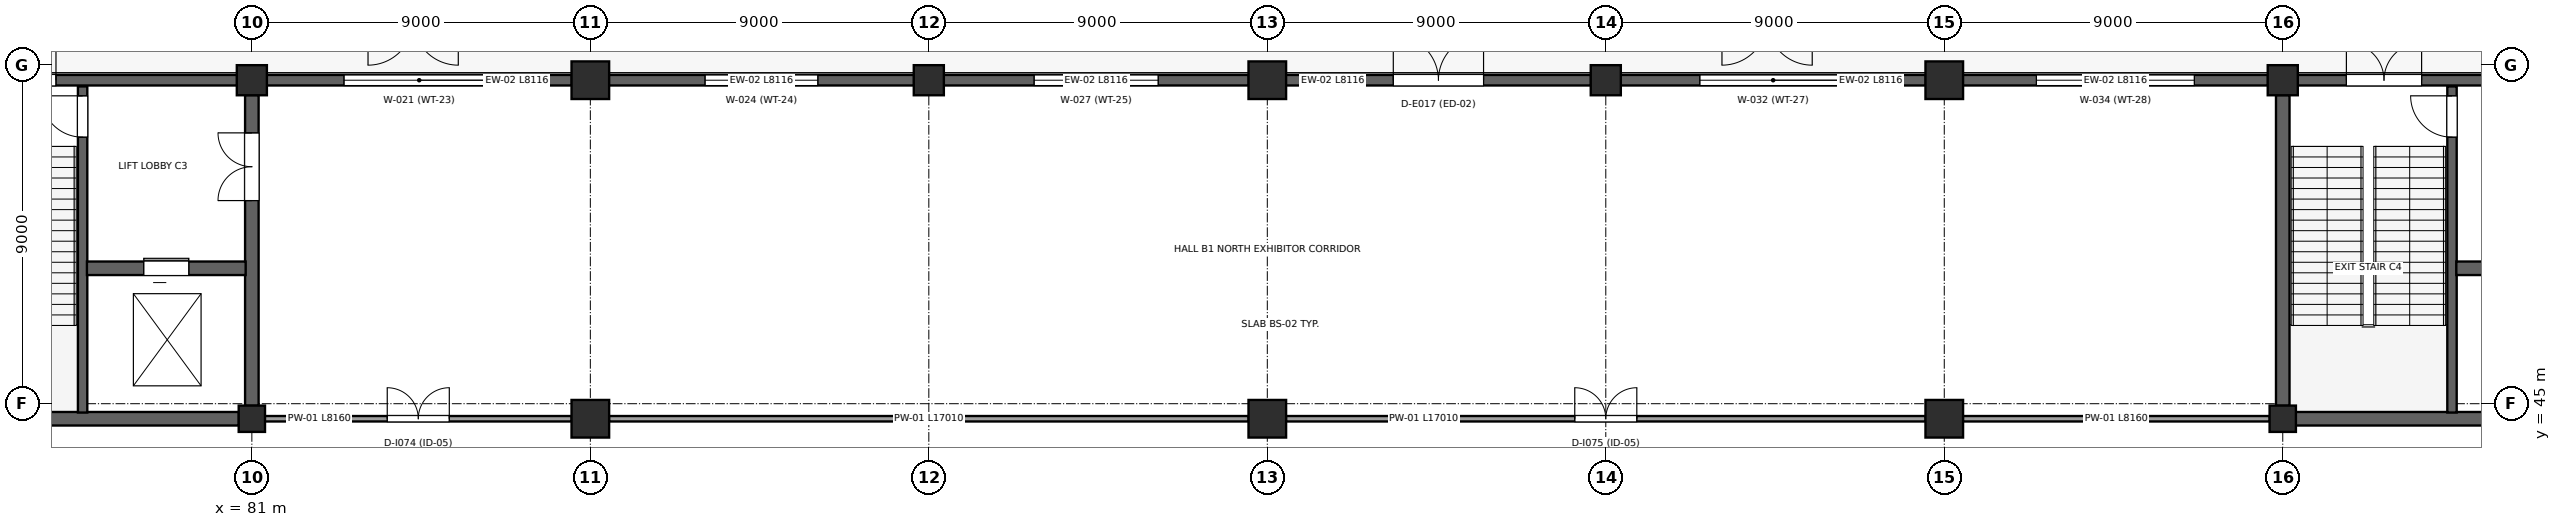
"""IFC4 building model, lengths in metres.
Left out: names, types, materials, properties, quantities, classifications, styles, units other than length and angle.
Written with IfcOpenShell. Run it as: python <this file> out.ifc"""

import sys

from ifc_helpers import new_model, si_unit, direction, frame, frame_2d, origin, origin_2d, place, context, subcontext, project, spatial, rectangle, extrude, element, fill, save


model = new_model("IFC4")
c1 = context("Model", 3, precision=1e-05, world=origin(), true_north=direction((0.0, 1.0)))
c2 = subcontext(c1, "Body", "Model", "MODEL_VIEW")
j1 = project(units=[si_unit("LENGTHUNIT", "METRE"), si_unit("PLANEANGLEUNIT", "RADIAN")], contexts=[c1])
p1 = place(None, origin())
s1 = spatial("IfcSite", under=j1, at=p1, CompositionType="ELEMENT")
p2 = place(p1, origin())
s2 = spatial("IfcBuilding", under=s1, at=p2, CompositionType="ELEMENT")
p3 = place(p2, origin())
s3 = spatial("IfcBuildingStorey", under=s2, at=p3, CompositionType="ELEMENT", Elevation=0.0)
for number, where, z_axis, x_axis in (
    (1, (90.0, 44.6, 0.0), (0.0, 0.0, 1.0), (1.0, 0.0, 0.0)),
    (2, (90.0, 53.6, 0.0), (0.0, 0.0, 1.0), (1.0, 0.0, 0.0)),
    (3, (108.0, 44.6, 0.0), (0.0, 0.0, 1.0), (1.0, 0.0, 0.0)),
    (4, (108.0, 53.6, 0.0), (0.0, 0.0, 1.0), (1.0, 0.0, 0.0)),
    (5, (126.0, 44.6, 0.0), (0.0, 0.0, 1.0), (1.0, 0.0, 0.0)),
    (6, (126.0, 53.6, 0.0), (0.0, 0.0, 1.0), (1.0, 0.0, 0.0)),
):
    element("IfcColumn", number, at=place(p3, frame(where, z_axis=z_axis, x_axis=x_axis)), inside=s3, PredefinedType="COLUMN", context=c2, shape_type="SweptSolid", body=[
        extrude(rectangle(XDim=1.0, YDim=1.0, at=origin_2d()), origin(), (0.0, 0.0, 1.0), 6.0),
    ])
for number, where, z_axis, x_axis in (
    (7, (81.0, 53.6, 0.0), (0.0, 0.0, 1.0), (1.0, 0.0, 0.0)),
    (8, (99.0, 53.6, 0.0), (0.0, 0.0, 1.0), (1.0, 0.0, 0.0)),
    (9, (117.0, 53.6, 0.0), (0.0, 0.0, 1.0), (1.0, 0.0, 0.0)),
    (10, (135.0, 53.6, 0.0), (0.0, 0.0, 1.0), (1.0, 0.0, 0.0)),
):
    element("IfcColumn", number, at=place(p3, frame(where, z_axis=z_axis, x_axis=x_axis)), inside=s3, PredefinedType="COLUMN", context=c2, shape_type="SweptSolid", body=[
        extrude(rectangle(XDim=0.8, YDim=0.8, at=origin_2d()), origin(), (0.0, 0.0, 1.0), 6.0),
    ])
for number, where, z_axis, x_axis in (
    (11, (81.0, 44.6, 0.0), (0.0, 0.0, 1.0), (1.0, 0.0, 0.0)),
    (12, (135.0, 44.6, 0.0), (0.0, 0.0, 1.0), (1.0, 0.0, 0.0)),
):
    element("IfcColumn", number, at=place(p3, frame(where, z_axis=z_axis, x_axis=x_axis)), inside=s3, PredefinedType="COLUMN", context=c2, shape_type="SweptSolid", body=[
        extrude(rectangle(XDim=0.7, YDim=0.7, at=origin_2d()), origin(), (0.0, 0.0, 1.0), 6.0),
    ])
p4 = place(p3, frame((72.492, 53.6, 0.0), z_axis=(0.0, 0.0, 1.0), x_axis=(1.0, 0.0, 0.0)))
e13 = element("IfcWall", 13, at=p4, inside=s3, PredefinedType="STANDARD", context=c2, shape_type="SweptSolid", body=[
    extrude(rectangle(XDim=8.116, YDim=0.28, at=frame_2d((4.058, 0.0))), origin(), (0.0, 0.0, 1.0), 5.75),
])
p5 = place(p4, frame((1.3, 0.0, 0.0)))
e14 = element("IfcOpeningElement", 14, at=p5, cuts=e13, PredefinedType="OPENING", context=c2, shape_type="SweptSolid", body=[
    extrude(rectangle(XDim=2.0, YDim=2.4, at=frame_2d((1.0, 1.2))), frame((0.0, 0.15, 0.0), z_axis=(0.0, -1.0, 0.0), x_axis=(1.0, 0.0, 0.0)), (0.0, 0.0, 1.0), 0.3),
])
p6 = place(p3, frame((81.392, 53.6, 0.0), z_axis=(0.0, 0.0, 1.0), x_axis=(1.0, 0.0, 0.0)))
e15 = element("IfcWall", 15, at=p6, inside=s3, PredefinedType="STANDARD", context=c2, shape_type="SweptSolid", body=[
    extrude(rectangle(XDim=8.116, YDim=0.28, at=frame_2d((4.058, 0.0))), origin(), (0.0, 0.0, 1.0), 5.75),
])
p7 = place(p6, frame((2.058, 0.0, 2.6)))
e16 = element("IfcOpeningElement", 16, at=p7, cuts=e15, PredefinedType="OPENING", context=c2, shape_type="SweptSolid", body=[
    extrude(rectangle(XDim=4.0, YDim=1.25, at=frame_2d((2.0, 0.625))), frame((0.0, 0.15, 0.0), z_axis=(0.0, -1.0, 0.0), x_axis=(1.0, 0.0, 0.0)), (0.0, 0.0, 1.0), 0.3),
])
p8 = place(p3, frame((90.492, 53.6, 0.0), z_axis=(0.0, 0.0, 1.0), x_axis=(1.0, 0.0, 0.0)))
e17 = element("IfcWall", 17, at=p8, inside=s3, PredefinedType="STANDARD", context=c2, shape_type="SweptSolid", body=[
    extrude(rectangle(XDim=8.116, YDim=0.28, at=frame_2d((4.058, 0.0))), origin(), (0.0, 0.0, 1.0), 5.75),
])
p9 = place(p8, frame((2.558, 0.0, 2.6)))
e18 = element("IfcOpeningElement", 18, at=p9, cuts=e17, PredefinedType="OPENING", context=c2, shape_type="SweptSolid", body=[
    extrude(rectangle(XDim=3.0, YDim=1.45, at=frame_2d((1.5, 0.725))), frame((0.0, 0.15, 0.0), z_axis=(0.0, -1.0, 0.0), x_axis=(1.0, 0.0, 0.0)), (0.0, 0.0, 1.0), 0.3),
])
p10 = place(p3, frame((99.392, 53.6, 0.0), z_axis=(0.0, 0.0, 1.0), x_axis=(1.0, 0.0, 0.0)))
e19 = element("IfcWall", 19, at=p10, inside=s3, PredefinedType="STANDARD", context=c2, shape_type="SweptSolid", body=[
    extrude(rectangle(XDim=8.116, YDim=0.28, at=frame_2d((4.058, 0.0))), origin(), (0.0, 0.0, 1.0), 5.75),
])
p11 = place(p10, frame((2.408, 0.0, 2.6)))
e20 = element("IfcOpeningElement", 20, at=p11, cuts=e19, PredefinedType="OPENING", context=c2, shape_type="SweptSolid", body=[
    extrude(rectangle(XDim=3.3, YDim=1.45, at=frame_2d((1.65, 0.725))), frame((0.0, 0.15, 0.0), z_axis=(0.0, -1.0, 0.0), x_axis=(1.0, 0.0, 0.0)), (0.0, 0.0, 1.0), 0.3),
])
p12 = place(p3, frame((108.492, 53.6, 0.0), z_axis=(0.0, 0.0, 1.0), x_axis=(1.0, 0.0, 0.0)))
e21 = element("IfcWall", 21, at=p12, inside=s3, PredefinedType="STANDARD", context=c2, shape_type="SweptSolid", body=[
    extrude(rectangle(XDim=8.116, YDim=0.28, at=frame_2d((4.058, 0.0))), origin(), (0.0, 0.0, 1.0), 5.75),
])
p13 = place(p12, frame((2.858, 0.0, 0.0)))
e22 = element("IfcOpeningElement", 22, at=p13, cuts=e21, PredefinedType="OPENING", context=c2, shape_type="SweptSolid", body=[
    extrude(rectangle(XDim=2.4, YDim=2.6, at=frame_2d((1.2, 1.3))), frame((0.0, 0.15, 0.0), z_axis=(0.0, -1.0, 0.0), x_axis=(1.0, 0.0, 0.0)), (0.0, 0.0, 1.0), 0.3),
])
p14 = place(p3, frame((117.392, 53.6, 0.0), z_axis=(0.0, 0.0, 1.0), x_axis=(1.0, 0.0, 0.0)))
e23 = element("IfcWall", 23, at=p14, inside=s3, PredefinedType="STANDARD", context=c2, shape_type="SweptSolid", body=[
    extrude(rectangle(XDim=8.116, YDim=0.28, at=frame_2d((4.058, 0.0))), origin(), (0.0, 0.0, 1.0), 5.75),
])
p15 = place(p14, frame((2.108, 0.0, 2.6)))
e24 = element("IfcOpeningElement", 24, at=p15, cuts=e23, PredefinedType="OPENING", context=c2, shape_type="SweptSolid", body=[
    extrude(rectangle(XDim=3.9, YDim=1.45, at=frame_2d((1.95, 0.725))), frame((0.0, 0.15, 0.0), z_axis=(0.0, -1.0, 0.0), x_axis=(1.0, 0.0, 0.0)), (0.0, 0.0, 1.0), 0.3),
])
p16 = place(p3, frame((126.492, 53.6, 0.0), z_axis=(0.0, 0.0, 1.0), x_axis=(1.0, 0.0, 0.0)))
e25 = element("IfcWall", 25, at=p16, inside=s3, PredefinedType="STANDARD", context=c2, shape_type="SweptSolid", body=[
    extrude(rectangle(XDim=8.116, YDim=0.28, at=frame_2d((4.058, 0.0))), origin(), (0.0, 0.0, 1.0), 5.75),
])
p17 = place(p16, frame((1.958, 0.0, 2.6)))
e26 = element("IfcOpeningElement", 26, at=p17, cuts=e25, PredefinedType="OPENING", context=c2, shape_type="SweptSolid", body=[
    extrude(rectangle(XDim=4.2, YDim=1.45, at=frame_2d((2.1, 0.725))), frame((0.0, 0.15, 0.0), z_axis=(0.0, -1.0, 0.0), x_axis=(1.0, 0.0, 0.0)), (0.0, 0.0, 1.0), 0.3),
])
p18 = place(p3, frame((135.392, 53.6, 0.0), z_axis=(0.0, 0.0, 1.0), x_axis=(1.0, 0.0, 0.0)))
e27 = element("IfcWall", 27, at=p18, inside=s3, PredefinedType="STANDARD", context=c2, shape_type="SweptSolid", body=[
    extrude(rectangle(XDim=8.116, YDim=0.28, at=frame_2d((4.058, 0.0))), origin(), (0.0, 0.0, 1.0), 5.75),
])
p19 = place(p18, frame((1.3, 0.0, 0.0)))
e28 = element("IfcOpeningElement", 28, at=p19, cuts=e27, PredefinedType="OPENING", context=c2, shape_type="SweptSolid", body=[
    extrude(rectangle(XDim=2.0, YDim=2.4, at=frame_2d((1.0, 1.2))), frame((0.0, 0.15, 0.0), z_axis=(0.0, -1.0, 0.0), x_axis=(1.0, 0.0, 0.0)), (0.0, 0.0, 1.0), 0.3),
])
p20 = place(p3, frame((81.0, 44.945, 0.0), z_axis=(0.0, 0.0, 1.0), x_axis=(0.0, 1.0, 0.0)))
e29 = element("IfcWall", 29, at=p20, inside=s3, PredefinedType="SHEAR", context=c2, shape_type="SweptSolid", body=[
    extrude(rectangle(XDim=8.26, YDim=0.36, at=frame_2d((4.13, 0.0))), origin(), (0.0, 0.0, 1.0), 5.75),
])
p21 = place(p20, frame((5.455, 0.0, 0.0)))
e30 = element("IfcOpeningElement", 30, at=p21, cuts=e29, PredefinedType="OPENING", context=c2, shape_type="SweptSolid", body=[
    extrude(rectangle(XDim=1.8, YDim=2.3, at=frame_2d((0.9, 1.15))), frame((0.0, 0.19, 0.0), z_axis=(0.0, -1.0, 0.0), x_axis=(1.0, 0.0, 0.0)), (0.0, 0.0, 1.0), 0.38),
])
p22 = place(p3, frame((72.495, 44.6, 0.0), z_axis=(0.0, 0.0, 1.0), x_axis=(1.0, 0.0, 0.0)))
e31 = element("IfcWall", 31, at=p22, inside=s3, PredefinedType="SHEAR", context=c2, shape_type="SweptSolid", body=[
    extrude(rectangle(XDim=8.16, YDim=0.36, at=frame_2d((4.08, 0.0))), origin(), (0.0, 0.0, 1.0), 5.75),
])
p23 = place(p3, frame((76.5, 44.765, 0.0), z_axis=(0.0, 0.0, 1.0), x_axis=(0.0, 1.0, 0.0)))
e32 = element("IfcWall", 32, at=p23, inside=s3, PredefinedType="SHEAR", context=c2, shape_type="SweptSolid", body=[
    extrude(rectangle(XDim=8.67, YDim=0.25, at=frame_2d((4.335, 0.0))), origin(), (0.0, 0.0, 1.0), 5.75),
])
p24 = place(p23, frame((7.32, 0.0, 0.0)))
e33 = element("IfcOpeningElement", 33, at=p24, cuts=e32, PredefinedType="OPENING", context=c2, shape_type="SweptSolid", body=[
    extrude(rectangle(XDim=1.1, YDim=2.2, at=frame_2d((0.55, 1.1))), frame((0.0, 0.135, 0.0), z_axis=(0.0, -1.0, 0.0), x_axis=(1.0, 0.0, 0.0)), (0.0, 0.0, 1.0), 0.27),
])
p25 = place(p3, frame((76.615, 48.6, 0.0), z_axis=(0.0, 0.0, 1.0), x_axis=(1.0, 0.0, 0.0)))
e34 = element("IfcWall", 34, at=p25, inside=s3, PredefinedType="SHEAR", context=c2, shape_type="SweptSolid", body=[
    extrude(rectangle(XDim=4.22, YDim=0.36, at=frame_2d((2.11, 0.0))), origin(), (0.0, 0.0, 1.0), 5.75),
])
p26 = place(p25, frame((1.51, 0.0, 0.0)))
e35 = element("IfcOpeningElement", 35, at=p26, cuts=e34, PredefinedType="OPENING", context=c2, shape_type="SweptSolid", body=[
    extrude(rectangle(XDim=1.2, YDim=2.3, at=frame_2d((0.6, 1.15))), frame((0.0, 0.19, 0.0), z_axis=(0.0, -1.0, 0.0), x_axis=(1.0, 0.0, 0.0)), (0.0, 0.0, 1.0), 0.38),
])
p27 = place(p3, frame((135.0, 44.945, 0.0), z_axis=(0.0, 0.0, 1.0), x_axis=(0.0, 1.0, 0.0)))
e36 = element("IfcWall", 36, at=p27, inside=s3, PredefinedType="SHEAR", context=c2, shape_type="SweptSolid", body=[
    extrude(rectangle(XDim=8.26, YDim=0.36, at=frame_2d((4.13, 0.0))), origin(), (0.0, 0.0, 1.0), 5.75),
])
p28 = place(p3, frame((135.345, 44.6, 0.0), z_axis=(0.0, 0.0, 1.0), x_axis=(1.0, 0.0, 0.0)))
e37 = element("IfcWall", 37, at=p28, inside=s3, PredefinedType="SHEAR", context=c2, shape_type="SweptSolid", body=[
    extrude(rectangle(XDim=8.16, YDim=0.36, at=frame_2d((4.08, 0.0))), origin(), (0.0, 0.0, 1.0), 5.75),
])
p29 = place(p3, frame((139.5, 44.765, 0.0), z_axis=(0.0, 0.0, 1.0), x_axis=(0.0, 1.0, 0.0)))
e38 = element("IfcWall", 38, at=p29, inside=s3, PredefinedType="SHEAR", context=c2, shape_type="SweptSolid", body=[
    extrude(rectangle(XDim=8.67, YDim=0.25, at=frame_2d((4.335, 0.0))), origin(), (0.0, 0.0, 1.0), 5.75),
])
p30 = place(p29, frame((7.32, 0.0, 0.0)))
e39 = element("IfcOpeningElement", 39, at=p30, cuts=e38, PredefinedType="OPENING", context=c2, shape_type="SweptSolid", body=[
    extrude(rectangle(XDim=1.1, YDim=2.2, at=frame_2d((0.55, 1.1))), frame((0.0, 0.135, 0.0), z_axis=(0.0, -1.0, 0.0), x_axis=(1.0, 0.0, 0.0)), (0.0, 0.0, 1.0), 0.27),
])
p31 = place(p3, frame((139.615, 48.6, 0.0), z_axis=(0.0, 0.0, 1.0), x_axis=(1.0, 0.0, 0.0)))
e40 = element("IfcWall", 40, at=p31, inside=s3, PredefinedType="SHEAR", context=c2, shape_type="SweptSolid", body=[
    extrude(rectangle(XDim=4.22, YDim=0.36, at=frame_2d((2.11, 0.0))), origin(), (0.0, 0.0, 1.0), 5.75),
])
p32 = place(p31, frame((1.51, 0.0, 0.0)))
e41 = element("IfcOpeningElement", 41, at=p32, cuts=e40, PredefinedType="OPENING", context=c2, shape_type="SweptSolid", body=[
    extrude(rectangle(XDim=1.2, YDim=2.3, at=frame_2d((0.6, 1.15))), frame((0.0, 0.19, 0.0), z_axis=(0.0, -1.0, 0.0), x_axis=(1.0, 0.0, 0.0)), (0.0, 0.0, 1.0), 0.38),
])
p33 = place(p3, frame((81.345, 44.6, 0.0), z_axis=(0.0, 0.0, 1.0), x_axis=(1.0, 0.0, 0.0)))
e42 = element("IfcWall", 42, at=p33, inside=s3, PredefinedType="PARTITIONING", context=c2, shape_type="SweptSolid", body=[
    extrude(rectangle(XDim=8.16, YDim=0.145, at=frame_2d((4.08, 0.0))), origin(), (0.0, 0.0, 1.0), 4.65),
])
p34 = place(p33, frame((3.255, 0.0, 0.0)))
e43 = element("IfcOpeningElement", 43, at=p34, cuts=e42, PredefinedType="OPENING", context=c2, shape_type="SweptSolid", body=[
    extrude(rectangle(XDim=1.65, YDim=2.25, at=frame_2d((0.825, 1.125))), frame((0.0, 0.083, 0.0), z_axis=(0.0, -1.0, 0.0), x_axis=(1.0, 0.0, 0.0)), (0.0, 0.0, 1.0), 0.165),
])
p35 = place(p3, frame((90.495, 44.6, 0.0), z_axis=(0.0, 0.0, 1.0), x_axis=(1.0, 0.0, 0.0)))
e44 = element("IfcWall", 44, at=p35, inside=s3, PredefinedType="PARTITIONING", context=c2, shape_type="SweptSolid", body=[
    extrude(rectangle(XDim=17.01, YDim=0.145, at=frame_2d((8.505, 0.0))), origin(), (0.0, 0.0, 1.0), 4.65),
])
p36 = place(p3, frame((108.495, 44.6, 0.0), z_axis=(0.0, 0.0, 1.0), x_axis=(1.0, 0.0, 0.0)))
e45 = element("IfcWall", 45, at=p36, inside=s3, PredefinedType="PARTITIONING", context=c2, shape_type="SweptSolid", body=[
    extrude(rectangle(XDim=17.01, YDim=0.145, at=frame_2d((8.505, 0.0))), origin(), (0.0, 0.0, 1.0), 4.65),
])
p37 = place(p36, frame((7.68, 0.0, 0.0)))
e46 = element("IfcOpeningElement", 46, at=p37, cuts=e45, PredefinedType="OPENING", context=c2, shape_type="SweptSolid", body=[
    extrude(rectangle(XDim=1.65, YDim=2.25, at=frame_2d((0.825, 1.125))), frame((0.0, 0.083, 0.0), z_axis=(0.0, -1.0, 0.0), x_axis=(1.0, 0.0, 0.0)), (0.0, 0.0, 1.0), 0.165),
])
p38 = place(p3, frame((126.495, 44.6, 0.0), z_axis=(0.0, 0.0, 1.0), x_axis=(1.0, 0.0, 0.0)))
e47 = element("IfcWall", 47, at=p38, inside=s3, PredefinedType="PARTITIONING", context=c2, shape_type="SweptSolid", body=[
    extrude(rectangle(XDim=8.16, YDim=0.145, at=frame_2d((4.08, 0.0))), origin(), (0.0, 0.0, 1.0), 4.65),
])
p39 = place(p5, origin())
e48 = element("IfcDoor", 48, at=p39, inside=s3, OperationType="DOUBLE_DOOR_SINGLE_SWING", PredefinedType="DOOR", context=c2, shape_type="SweptSolid", body=[
    extrude(rectangle(XDim=2.0, YDim=2.4, at=frame_2d((1.0, 1.2))), frame((0.0, 0.025, 0.0), z_axis=(0.0, -1.0, 0.0), x_axis=(1.0, 0.0, 0.0)), (0.0, 0.0, 1.0), 0.05),
])
fill(e14, e48)
p40 = place(p7, origin())
e49 = element("IfcWindow", 49, at=p40, inside=s3, PartitioningType="SINGLE_PANEL", PredefinedType="WINDOW", context=c2, shape_type="SweptSolid", body=[
    extrude(rectangle(XDim=4.0, YDim=1.25, at=frame_2d((2.0, 0.625))), frame((0.0, 0.03, 0.0), z_axis=(0.0, -1.0, 0.0), x_axis=(1.0, 0.0, 0.0)), (0.0, 0.0, 1.0), 0.06),
])
fill(e16, e49)
p41 = place(p9, origin())
e50 = element("IfcWindow", 50, at=p41, inside=s3, PartitioningType="SINGLE_PANEL", PredefinedType="WINDOW", context=c2, shape_type="SweptSolid", body=[
    extrude(rectangle(XDim=3.0, YDim=1.45, at=frame_2d((1.5, 0.725))), frame((0.0, 0.03, 0.0), z_axis=(0.0, -1.0, 0.0), x_axis=(1.0, 0.0, 0.0)), (0.0, 0.0, 1.0), 0.06),
])
fill(e18, e50)
p42 = place(p11, origin())
e51 = element("IfcWindow", 51, at=p42, inside=s3, PartitioningType="SINGLE_PANEL", PredefinedType="WINDOW", context=c2, shape_type="SweptSolid", body=[
    extrude(rectangle(XDim=3.3, YDim=1.45, at=frame_2d((1.65, 0.725))), frame((0.0, 0.03, 0.0), z_axis=(0.0, -1.0, 0.0), x_axis=(1.0, 0.0, 0.0)), (0.0, 0.0, 1.0), 0.06),
])
fill(e20, e51)
p43 = place(p13, origin())
e52 = element("IfcDoor", 52, at=p43, inside=s3, OperationType="DOUBLE_DOOR_SINGLE_SWING", PredefinedType="DOOR", context=c2, shape_type="SweptSolid", body=[
    extrude(rectangle(XDim=2.4, YDim=2.6, at=frame_2d((1.2, 1.3))), frame((0.0, 0.025, 0.0), z_axis=(0.0, -1.0, 0.0), x_axis=(1.0, 0.0, 0.0)), (0.0, 0.0, 1.0), 0.05),
])
fill(e22, e52)
p44 = place(p15, origin())
e53 = element("IfcWindow", 53, at=p44, inside=s3, PartitioningType="SINGLE_PANEL", PredefinedType="WINDOW", context=c2, shape_type="SweptSolid", body=[
    extrude(rectangle(XDim=3.9, YDim=1.45, at=frame_2d((1.95, 0.725))), frame((0.0, 0.03, 0.0), z_axis=(0.0, -1.0, 0.0), x_axis=(1.0, 0.0, 0.0)), (0.0, 0.0, 1.0), 0.06),
])
fill(e24, e53)
p45 = place(p17, origin())
e54 = element("IfcWindow", 54, at=p45, inside=s3, PartitioningType="SINGLE_PANEL", PredefinedType="WINDOW", context=c2, shape_type="SweptSolid", body=[
    extrude(rectangle(XDim=4.2, YDim=1.45, at=frame_2d((2.1, 0.725))), frame((0.0, 0.03, 0.0), z_axis=(0.0, -1.0, 0.0), x_axis=(1.0, 0.0, 0.0)), (0.0, 0.0, 1.0), 0.06),
])
fill(e26, e54)
p46 = place(p19, origin())
e55 = element("IfcDoor", 55, at=p46, inside=s3, OperationType="DOUBLE_DOOR_SINGLE_SWING", PredefinedType="DOOR", context=c2, shape_type="SweptSolid", body=[
    extrude(rectangle(XDim=2.0, YDim=2.4, at=frame_2d((1.0, 1.2))), frame((0.0, 0.025, 0.0), z_axis=(0.0, -1.0, 0.0), x_axis=(1.0, 0.0, 0.0)), (0.0, 0.0, 1.0), 0.05),
])
fill(e28, e55)
p47 = place(p24, origin())
e56 = element("IfcDoor", 56, at=p47, inside=s3, OperationType="SINGLE_SWING_RIGHT", PredefinedType="DOOR", context=c2, shape_type="SweptSolid", body=[
    extrude(rectangle(XDim=1.1, YDim=2.2, at=frame_2d((0.55, 1.1))), frame((0.0, 0.025, 0.0), z_axis=(0.0, -1.0, 0.0), x_axis=(1.0, 0.0, 0.0)), (0.0, 0.0, 1.0), 0.05),
])
fill(e33, e56)
p48 = place(p26, origin())
e57 = element("IfcDoor", 57, at=p48, inside=s3, OperationType="SLIDING_TO_LEFT", PredefinedType="DOOR", context=c2, shape_type="SweptSolid", body=[
    extrude(rectangle(XDim=1.2, YDim=2.3, at=frame_2d((0.6, 1.15))), frame((0.0, 0.025, 0.0), z_axis=(0.0, -1.0, 0.0), x_axis=(1.0, 0.0, 0.0)), (0.0, 0.0, 1.0), 0.05),
])
fill(e35, e57)
p49 = place(p21, origin())
e58 = element("IfcDoor", 58, at=p49, inside=s3, OperationType="DOUBLE_DOOR_SINGLE_SWING", PredefinedType="DOOR", context=c2, shape_type="SweptSolid", body=[
    extrude(rectangle(XDim=1.8, YDim=2.3, at=frame_2d((0.9, 1.15))), frame((0.0, 0.025, 0.0), z_axis=(0.0, -1.0, 0.0), x_axis=(1.0, 0.0, 0.0)), (0.0, 0.0, 1.0), 0.05),
])
fill(e30, e58)
p50 = place(p30, origin())
e59 = element("IfcDoor", 59, at=p50, inside=s3, OperationType="SINGLE_SWING_RIGHT", PredefinedType="DOOR", context=c2, shape_type="SweptSolid", body=[
    extrude(rectangle(XDim=1.1, YDim=2.2, at=frame_2d((0.55, 1.1))), frame((0.0, 0.025, 0.0), z_axis=(0.0, -1.0, 0.0), x_axis=(1.0, 0.0, 0.0)), (0.0, 0.0, 1.0), 0.05),
])
fill(e39, e59)
p51 = place(p34, origin())
e60 = element("IfcDoor", 60, at=p51, inside=s3, OperationType="DOUBLE_DOOR_SINGLE_SWING", PredefinedType="DOOR", context=c2, shape_type="SweptSolid", body=[
    extrude(rectangle(XDim=1.65, YDim=2.25, at=frame_2d((0.825, 1.125))), frame((0.0, 0.025, 0.0), z_axis=(0.0, -1.0, 0.0), x_axis=(1.0, 0.0, 0.0)), (0.0, 0.0, 1.0), 0.05),
])
fill(e43, e60)
p52 = place(p37, origin())
e61 = element("IfcDoor", 61, at=p52, inside=s3, OperationType="DOUBLE_DOOR_SINGLE_SWING", PredefinedType="DOOR", context=c2, shape_type="SweptSolid", body=[
    extrude(rectangle(XDim=1.65, YDim=2.25, at=frame_2d((0.825, 1.125))), frame((0.0, 0.025, 0.0), z_axis=(0.0, -1.0, 0.0), x_axis=(1.0, 0.0, 0.0)), (0.0, 0.0, 1.0), 0.05),
])
fill(e46, e61)
save(model, sys.argv[1])
